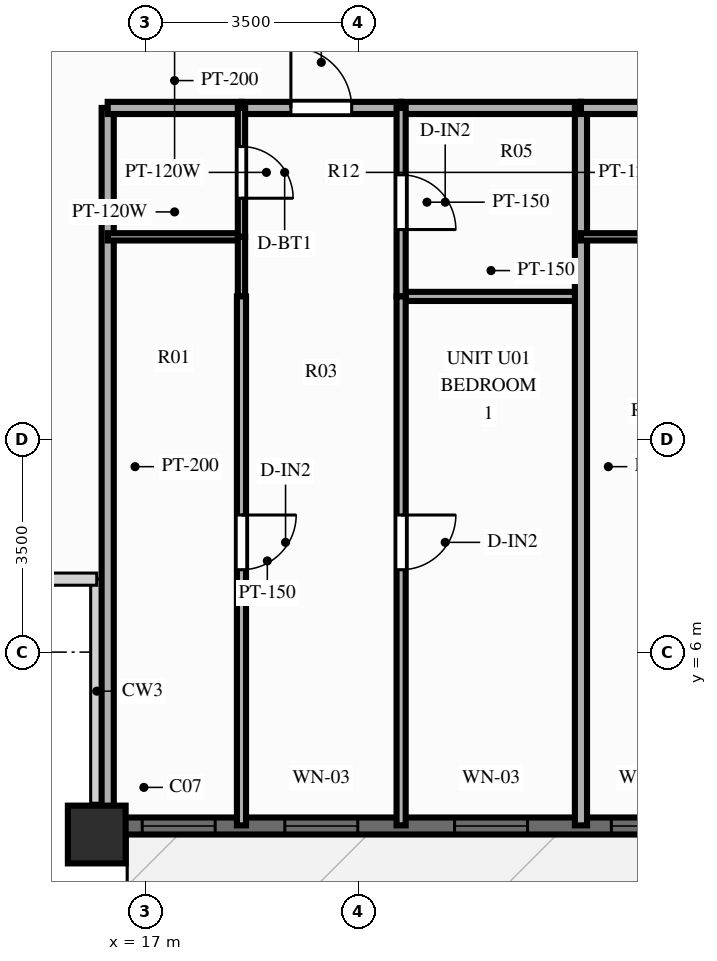
"""IFC4 building model, lengths in metres.
Left out: names, types, materials, properties, quantities, classifications, styles, units other than length and angle.
Written with IfcOpenShell. Run it as: python <this file> out.ifc"""

import sys

from ifc_helpers import new_model, si_unit, direction, frame, frame_2d, origin, origin_2d, place, context, subcontext, project, spatial, rectangle, extrude, source, transform, mapped, element, fill, save


model = new_model("IFC4")
c1 = context("Model", 3, precision=1e-05, world=origin(), true_north=direction((0.0, 1.0)))
c2 = subcontext(c1, "Body", "Model", "MODEL_VIEW")
j1 = project(units=[si_unit("LENGTHUNIT", "METRE"), si_unit("PLANEANGLEUNIT", "RADIAN")], contexts=[c1])
p1 = place(None, origin())
s1 = spatial("IfcSite", under=j1, at=p1, CompositionType="ELEMENT")
p2 = place(p1, origin())
s2 = spatial("IfcBuilding", under=s1, at=p2, CompositionType="ELEMENT")
p3 = place(p2, frame((0.0, 0.0, 80.85)))
s3 = spatial("IfcBuildingStorey", under=s2, at=p3, CompositionType="ELEMENT", Elevation=80.85)
m1 = source(origin(), c2, "Body", "SweptSolid", [
    extrude(rectangle(XDim=0.95, YDim=0.95, at=origin_2d()), origin(), (0.0, 0.0, 1.0), 3.0),
])
p4 = place(p3, frame((16.2, 3.0, 0.0), z_axis=(0.0, 0.0, 1.0), x_axis=(1.0, 0.0, 0.0)))
e1 = element("IfcColumn", 1, at=p4, inside=s3, PredefinedType="COLUMN", context=c2, shape_type="MappedRepresentation", body=[
    mapped(m1, transform((0.0, 0.0, 0.0), scale=1.0)),
])
p5 = place(p3, frame((16.2, 3.14, 0.0), z_axis=(0.0, 0.0, 1.0), x_axis=(1.0, 0.0, 0.0)))
e2 = element("IfcWall", 2, at=p5, inside=s3, PredefinedType="SOLIDWALL", context=c2, shape_type="SweptSolid", body=[
    extrude(rectangle(XDim=43.6, YDim=0.28, at=frame_2d((21.8, 0.0))), origin(), (0.0, 0.0, 1.0), 2.28),
])
p6 = place(p5, frame((0.748, 0.0, 0.25)))
e3 = element("IfcOpeningElement", 3, at=p6, cuts=e2, PredefinedType="OPENING", context=c2, shape_type="SweptSolid", body=[
    extrude(rectangle(XDim=1.2, YDim=1.5, at=frame_2d((0.6, 0.75))), frame((0.0, 0.152, 0.0), z_axis=(0.0, -1.0, 0.0), x_axis=(1.0, 0.0, 0.0)), (0.0, 0.0, 1.0), 0.304),
])
p7 = place(p5, frame((3.093, 0.0, 0.25)))
e4 = element("IfcOpeningElement", 4, at=p7, cuts=e2, PredefinedType="OPENING", context=c2, shape_type="SweptSolid", body=[
    extrude(rectangle(XDim=1.2, YDim=1.5, at=frame_2d((0.6, 0.75))), frame((0.0, 0.152, 0.0), z_axis=(0.0, -1.0, 0.0), x_axis=(1.0, 0.0, 0.0)), (0.0, 0.0, 1.0), 0.304),
])
p8 = place(p5, frame((5.885, 0.0, 0.25)))
e5 = element("IfcOpeningElement", 5, at=p8, cuts=e2, PredefinedType="OPENING", context=c2, shape_type="SweptSolid", body=[
    extrude(rectangle(XDim=1.2, YDim=1.5, at=frame_2d((0.6, 0.75))), frame((0.0, 0.152, 0.0), z_axis=(0.0, -1.0, 0.0), x_axis=(1.0, 0.0, 0.0)), (0.0, 0.0, 1.0), 0.304),
])
p9 = place(p5, frame((8.463, 0.0, 0.25)))
e6 = element("IfcOpeningElement", 6, at=p9, cuts=e2, PredefinedType="OPENING", context=c2, shape_type="SweptSolid", body=[
    extrude(rectangle(XDim=1.2, YDim=1.5, at=frame_2d((0.6, 0.75))), frame((0.0, 0.152, 0.0), z_axis=(0.0, -1.0, 0.0), x_axis=(1.0, 0.0, 0.0)), (0.0, 0.0, 1.0), 0.304),
])
p10 = place(p5, frame((10.876, 0.0, 0.25)))
e7 = element("IfcOpeningElement", 7, at=p10, cuts=e2, PredefinedType="OPENING", context=c2, shape_type="SweptSolid", body=[
    extrude(rectangle(XDim=1.2, YDim=1.5, at=frame_2d((0.6, 0.75))), frame((0.0, 0.152, 0.0), z_axis=(0.0, -1.0, 0.0), x_axis=(1.0, 0.0, 0.0)), (0.0, 0.0, 1.0), 0.304),
])
p11 = place(p5, frame((13.287, 0.0, 0.25)))
e8 = element("IfcOpeningElement", 8, at=p11, cuts=e2, PredefinedType="OPENING", context=c2, shape_type="SweptSolid", body=[
    extrude(rectangle(XDim=1.2, YDim=1.5, at=frame_2d((0.6, 0.75))), frame((0.0, 0.152, 0.0), z_axis=(0.0, -1.0, 0.0), x_axis=(1.0, 0.0, 0.0)), (0.0, 0.0, 1.0), 0.304),
])
p12 = place(p5, frame((16.521, 0.0, 0.25)))
e9 = element("IfcOpeningElement", 9, at=p12, cuts=e2, PredefinedType="OPENING", context=c2, shape_type="SweptSolid", body=[
    extrude(rectangle(XDim=1.2, YDim=1.5, at=frame_2d((0.6, 0.75))), frame((0.0, 0.152, 0.0), z_axis=(0.0, -1.0, 0.0), x_axis=(1.0, 0.0, 0.0)), (0.0, 0.0, 1.0), 0.304),
])
p13 = place(p5, frame((22.938, 0.0, 0.0), z_axis=(0.0, 0.0, 1.0), x_axis=(-1.0, 0.0, 0.0)))
e10 = element("IfcOpeningElement", 10, at=p13, cuts=e2, PredefinedType="OPENING", context=c2, shape_type="SweptSolid", body=[
    extrude(rectangle(XDim=1.1, YDim=2.15, at=frame_2d((0.55, 1.075))), frame((0.0, 0.152, 0.0), z_axis=(0.0, -1.0, 0.0), x_axis=(1.0, 0.0, 0.0)), (0.0, 0.0, 1.0), 0.304),
])
p14 = place(p5, frame((26.657, 0.0, 0.25)))
e11 = element("IfcOpeningElement", 11, at=p14, cuts=e2, PredefinedType="OPENING", context=c2, shape_type="SweptSolid", body=[
    extrude(rectangle(XDim=0.95, YDim=1.5, at=frame_2d((0.475, 0.75))), frame((0.0, 0.152, 0.0), z_axis=(0.0, -1.0, 0.0), x_axis=(1.0, 0.0, 0.0)), (0.0, 0.0, 1.0), 0.304),
])
p15 = place(p5, frame((28.965, 0.0, 0.25)))
e12 = element("IfcOpeningElement", 12, at=p15, cuts=e2, PredefinedType="OPENING", context=c2, shape_type="SweptSolid", body=[
    extrude(rectangle(XDim=0.7, YDim=1.5, at=frame_2d((0.35, 0.75))), frame((0.0, 0.152, 0.0), z_axis=(0.0, -1.0, 0.0), x_axis=(1.0, 0.0, 0.0)), (0.0, 0.0, 1.0), 0.304),
])
p16 = place(p5, frame((31.158, 0.0, 0.25)))
e13 = element("IfcOpeningElement", 13, at=p16, cuts=e2, PredefinedType="OPENING", context=c2, shape_type="SweptSolid", body=[
    extrude(rectangle(XDim=1.2, YDim=1.5, at=frame_2d((0.6, 0.75))), frame((0.0, 0.152, 0.0), z_axis=(0.0, -1.0, 0.0), x_axis=(1.0, 0.0, 0.0)), (0.0, 0.0, 1.0), 0.304),
])
p17 = place(p5, frame((35.992, 0.0, 0.25)))
e14 = element("IfcOpeningElement", 14, at=p17, cuts=e2, PredefinedType="OPENING", context=c2, shape_type="SweptSolid", body=[
    extrude(rectangle(XDim=1.2, YDim=1.5, at=frame_2d((0.6, 0.75))), frame((0.0, 0.152, 0.0), z_axis=(0.0, -1.0, 0.0), x_axis=(1.0, 0.0, 0.0)), (0.0, 0.0, 1.0), 0.304),
])
p18 = place(p5, frame((40.885, 0.0, 0.25)))
e15 = element("IfcOpeningElement", 15, at=p18, cuts=e2, PredefinedType="OPENING", context=c2, shape_type="SweptSolid", body=[
    extrude(rectangle(XDim=1.2, YDim=1.5, at=frame_2d((0.6, 0.75))), frame((0.0, 0.152, 0.0), z_axis=(0.0, -1.0, 0.0), x_axis=(1.0, 0.0, 0.0)), (0.0, 0.0, 1.0), 0.304),
])
p19 = place(p3, frame((16.38, 14.95, 0.0), z_axis=(0.0, 0.0, 1.0), x_axis=(0.0, -1.0, 0.0)))
e16 = element("IfcWall", 16, at=p19, inside=s3, PredefinedType="PARTITIONING", context=c2, shape_type="SweptSolid", body=[
    extrude(rectangle(XDim=11.8, YDim=0.2, at=frame_2d((5.9, 0.0))), origin(), (0.0, 0.0, 1.0), 2.79),
])
p20 = place(p3, frame((16.38, 14.95, 0.0), z_axis=(0.0, 0.0, 1.0), x_axis=(1.0, 0.0, 0.0)))
e17 = element("IfcWall", 17, at=p20, inside=s3, PredefinedType="PARTITIONING", context=c2, shape_type="SweptSolid", body=[
    extrude(rectangle(XDim=2.2, YDim=0.2, at=frame_2d((1.1, 0.0))), origin(), (0.0, 0.0, 1.0), 2.79),
])
p21 = place(p3, frame((18.58, 14.95, 0.0), z_axis=(0.0, 0.0, 1.0), x_axis=(1.0, 0.0, 0.0)))
e18 = element("IfcWall", 18, at=p21, inside=s3, PredefinedType="PARTITIONING", context=c2, shape_type="SweptSolid", body=[
    extrude(rectangle(XDim=2.625, YDim=0.2, at=frame_2d((1.313, 0.0))), origin(), (0.0, 0.0, 1.0), 2.79),
])
p22 = place(p21, frame((0.813, 0.0, 0.0)))
e19 = element("IfcOpeningElement", 19, at=p22, cuts=e18, PredefinedType="OPENING", context=c2, shape_type="SweptSolid", body=[
    extrude(rectangle(XDim=1.0, YDim=2.15, at=frame_2d((0.5, 1.075))), frame((0.0, 0.112, 0.0), z_axis=(0.0, -1.0, 0.0), x_axis=(1.0, 0.0, 0.0)), (0.0, 0.0, 1.0), 0.224),
])
p23 = place(p3, frame((21.206, 14.95, 0.0), z_axis=(0.0, 0.0, 1.0), x_axis=(1.0, 0.0, 0.0)))
e20 = element("IfcWall", 20, at=p23, inside=s3, PredefinedType="PARTITIONING", context=c2, shape_type="SweptSolid", body=[
    extrude(rectangle(XDim=2.958, YDim=0.2, at=frame_2d((1.479, 0.0))), origin(), (0.0, 0.0, 1.0), 2.79),
])
p24 = place(p3, frame((16.38, 12.83, 0.0), z_axis=(0.0, 0.0, 1.0), x_axis=(1.0, 0.0, 0.0)))
e21 = element("IfcWall", 21, at=p24, inside=s3, PredefinedType="PARTITIONING", context=c2, shape_type="SweptSolid", body=[
    extrude(rectangle(XDim=2.2, YDim=0.12, at=frame_2d((1.1, 0.0))), origin(), (0.0, 0.0, 1.0), 2.79),
])
p25 = place(p3, frame((21.206, 11.85, 0.0), z_axis=(0.0, 0.0, 1.0), x_axis=(1.0, 0.0, 0.0)))
e22 = element("IfcWall", 22, at=p25, inside=s3, PredefinedType="PARTITIONING", context=c2, shape_type="SweptSolid", body=[
    extrude(rectangle(XDim=2.958, YDim=0.15, at=frame_2d((1.479, 0.0))), origin(), (0.0, 0.0, 1.0), 2.79),
])
p26 = place(p3, frame((18.58, 14.95, 0.0), z_axis=(0.0, 0.0, 1.0), x_axis=(0.0, -1.0, 0.0)))
e23 = element("IfcWall", 23, at=p26, inside=s3, PredefinedType="PARTITIONING", context=c2, shape_type="SweptSolid", body=[
    extrude(rectangle(XDim=2.12, YDim=0.12, at=frame_2d((1.06, 0.0))), origin(), (0.0, 0.0, 1.0), 2.79),
])
p27 = place(p26, frame((0.635, 0.0, 0.0)))
e24 = element("IfcOpeningElement", 24, at=p27, cuts=e23, PredefinedType="OPENING", context=c2, shape_type="SweptSolid", body=[
    extrude(rectangle(XDim=0.85, YDim=2.05, at=frame_2d((0.425, 1.025))), frame((0.0, 0.072, 0.0), z_axis=(0.0, -1.0, 0.0), x_axis=(1.0, 0.0, 0.0)), (0.0, 0.0, 1.0), 0.144),
])
p28 = place(p3, frame((18.58, 12.83, 0.0), z_axis=(0.0, 0.0, 1.0), x_axis=(0.0, -1.0, 0.0)))
e25 = element("IfcWall", 25, at=p28, inside=s3, PredefinedType="PARTITIONING", context=c2, shape_type="SweptSolid", body=[
    extrude(rectangle(XDim=0.98, YDim=0.12, at=frame_2d((0.49, 0.0))), origin(), (0.0, 0.0, 1.0), 2.79),
])
p29 = place(p3, frame((18.58, 11.85, 0.0), z_axis=(0.0, 0.0, 1.0), x_axis=(0.0, -1.0, 0.0)))
e26 = element("IfcWall", 26, at=p29, inside=s3, PredefinedType="PARTITIONING", context=c2, shape_type="SweptSolid", body=[
    extrude(rectangle(XDim=8.7, YDim=0.15, at=frame_2d((4.35, 0.0))), origin(), (0.0, 0.0, 1.0), 2.79),
])
p30 = place(p29, frame((3.595, 0.0, 0.0)))
e27 = element("IfcOpeningElement", 27, at=p30, cuts=e26, PredefinedType="OPENING", context=c2, shape_type="SweptSolid", body=[
    extrude(rectangle(XDim=0.9, YDim=2.1, at=frame_2d((0.45, 1.05))), frame((0.0, 0.087, 0.0), z_axis=(0.0, -1.0, 0.0), x_axis=(1.0, 0.0, 0.0)), (0.0, 0.0, 1.0), 0.174),
])
p31 = place(p3, frame((21.206, 14.95, 0.0), z_axis=(0.0, 0.0, 1.0), x_axis=(0.0, -1.0, 0.0)))
e28 = element("IfcWall", 28, at=p31, inside=s3, PredefinedType="PARTITIONING", context=c2, shape_type="SweptSolid", body=[
    extrude(rectangle(XDim=3.1, YDim=0.15, at=frame_2d((1.55, 0.0))), origin(), (0.0, 0.0, 1.0), 2.79),
])
p32 = place(p31, frame((1.1, 0.0, 0.0)))
e29 = element("IfcOpeningElement", 29, at=p32, cuts=e28, PredefinedType="OPENING", context=c2, shape_type="SweptSolid", body=[
    extrude(rectangle(XDim=0.9, YDim=2.1, at=frame_2d((0.45, 1.05))), frame((0.0, 0.087, 0.0), z_axis=(0.0, -1.0, 0.0), x_axis=(1.0, 0.0, 0.0)), (0.0, 0.0, 1.0), 0.174),
])
p33 = place(p3, frame((21.206, 11.85, 0.0), z_axis=(0.0, 0.0, 1.0), x_axis=(0.0, -1.0, 0.0)))
e30 = element("IfcWall", 30, at=p33, inside=s3, PredefinedType="PARTITIONING", context=c2, shape_type="SweptSolid", body=[
    extrude(rectangle(XDim=8.7, YDim=0.15, at=frame_2d((4.35, 0.0))), origin(), (0.0, 0.0, 1.0), 2.79),
])
p34 = place(p33, frame((3.595, 0.0, 0.0)))
e31 = element("IfcOpeningElement", 31, at=p34, cuts=e30, PredefinedType="OPENING", context=c2, shape_type="SweptSolid", body=[
    extrude(rectangle(XDim=0.9, YDim=2.1, at=frame_2d((0.45, 1.05))), frame((0.0, 0.087, 0.0), z_axis=(0.0, -1.0, 0.0), x_axis=(1.0, 0.0, 0.0)), (0.0, 0.0, 1.0), 0.174),
])
p35 = place(p3, frame((24.163, 14.95, 0.0), z_axis=(0.0, 0.0, 1.0), x_axis=(0.0, -1.0, 0.0)))
e32 = element("IfcWall", 32, at=p35, inside=s3, PredefinedType="PARTITIONING", context=c2, shape_type="SweptSolid", body=[
    extrude(rectangle(XDim=11.8, YDim=0.2, at=frame_2d((5.9, 0.0))), origin(), (0.0, 0.0, 1.0), 2.79),
])
p36 = place(p3, frame((24.163, 14.95, 0.0), z_axis=(0.0, 0.0, 1.0), x_axis=(1.0, 0.0, 0.0)))
e33 = element("IfcWall", 33, at=p36, inside=s3, PredefinedType="PARTITIONING", context=c2, shape_type="SweptSolid", body=[
    extrude(rectangle(XDim=2.2, YDim=0.2, at=frame_2d((1.1, 0.0))), origin(), (0.0, 0.0, 1.0), 2.79),
])
p37 = place(p3, frame((24.163, 12.83, 0.0), z_axis=(0.0, 0.0, 1.0), x_axis=(1.0, 0.0, 0.0)))
e34 = element("IfcWall", 34, at=p37, inside=s3, PredefinedType="PARTITIONING", context=c2, shape_type="SweptSolid", body=[
    extrude(rectangle(XDim=2.2, YDim=0.12, at=frame_2d((1.1, 0.0))), origin(), (0.0, 0.0, 1.0), 2.79),
])
m2 = source(origin(), c2, "Body", "SweptSolid", [
    extrude(rectangle(XDim=1.2, YDim=1.5, at=frame_2d((0.6, 0.75))), frame((0.0, 0.03, 0.0), z_axis=(0.0, -1.0, 0.0), x_axis=(1.0, 0.0, 0.0)), (0.0, 0.0, 1.0), 0.06),
])
p38 = place(p6, origin())
e35 = element("IfcWindow", 35, at=p38, inside=s3, PartitioningType="SINGLE_PANEL", PredefinedType="WINDOW", context=c2, shape_type="MappedRepresentation", body=[
    mapped(m2, transform((0.0, 0.0, 0.0), scale=1.0)),
])
fill(e3, e35)
p39 = place(p7, origin())
e36 = element("IfcWindow", 36, at=p39, inside=s3, PartitioningType="SINGLE_PANEL", PredefinedType="WINDOW", context=c2, shape_type="MappedRepresentation", body=[
    mapped(m2, transform((0.0, 0.0, 0.0), scale=1.0)),
])
fill(e4, e36)
p40 = place(p8, origin())
e37 = element("IfcWindow", 37, at=p40, inside=s3, PartitioningType="SINGLE_PANEL", PredefinedType="WINDOW", context=c2, shape_type="MappedRepresentation", body=[
    mapped(m2, transform((0.0, 0.0, 0.0), scale=1.0)),
])
fill(e5, e37)
p41 = place(p9, origin())
e38 = element("IfcWindow", 38, at=p41, inside=s3, PartitioningType="SINGLE_PANEL", PredefinedType="WINDOW", context=c2, shape_type="MappedRepresentation", body=[
    mapped(m2, transform((0.0, 0.0, 0.0), scale=1.0)),
])
fill(e6, e38)
m3 = source(origin(), c2, "Body", "SweptSolid", [
    extrude(rectangle(XDim=1.0, YDim=2.15, at=frame_2d((0.5, 1.075))), frame((0.0, 0.025, 0.0), z_axis=(0.0, -1.0, 0.0), x_axis=(1.0, 0.0, 0.0)), (0.0, 0.0, 1.0), 0.05),
])
p42 = place(p22, origin())
e39 = element("IfcDoor", 39, at=p42, inside=s3, OperationType="SINGLE_SWING_LEFT", PredefinedType="DOOR", context=c2, shape_type="MappedRepresentation", body=[
    mapped(m3, transform((0.0, 0.0, 0.0), scale=1.0)),
])
fill(e19, e39)
m4 = source(origin(), c2, "Body", "SweptSolid", [
    extrude(rectangle(XDim=0.85, YDim=2.05, at=frame_2d((0.425, 1.025))), frame((0.0, 0.025, 0.0), z_axis=(0.0, -1.0, 0.0), x_axis=(1.0, 0.0, 0.0)), (0.0, 0.0, 1.0), 0.05),
])
p43 = place(p27, origin())
e40 = element("IfcDoor", 40, at=p43, inside=s3, OperationType="SINGLE_SWING_RIGHT", PredefinedType="DOOR", context=c2, shape_type="MappedRepresentation", body=[
    mapped(m4, transform((0.0, 0.0, 0.0), scale=1.0)),
])
fill(e24, e40)
m5 = source(origin(), c2, "Body", "SweptSolid", [
    extrude(rectangle(XDim=0.9, YDim=2.1, at=frame_2d((0.45, 1.05))), frame((0.0, 0.025, 0.0), z_axis=(0.0, -1.0, 0.0), x_axis=(1.0, 0.0, 0.0)), (0.0, 0.0, 1.0), 0.05),
])
p44 = place(p30, origin())
e41 = element("IfcDoor", 41, at=p44, inside=s3, OperationType="SINGLE_SWING_LEFT", PredefinedType="DOOR", context=c2, shape_type="MappedRepresentation", body=[
    mapped(m5, transform((0.0, 0.0, 0.0), scale=1.0)),
])
fill(e27, e41)
p45 = place(p32, origin())
e42 = element("IfcDoor", 42, at=p45, inside=s3, OperationType="SINGLE_SWING_RIGHT", PredefinedType="DOOR", context=c2, shape_type="MappedRepresentation", body=[
    mapped(m5, transform((0.0, 0.0, 0.0), scale=1.0)),
])
fill(e29, e42)
p46 = place(p34, origin())
e43 = element("IfcDoor", 43, at=p46, inside=s3, OperationType="SINGLE_SWING_LEFT", PredefinedType="DOOR", context=c2, shape_type="MappedRepresentation", body=[
    mapped(m5, transform((0.0, 0.0, 0.0), scale=1.0)),
])
fill(e31, e43)
save(model, sys.argv[1])
